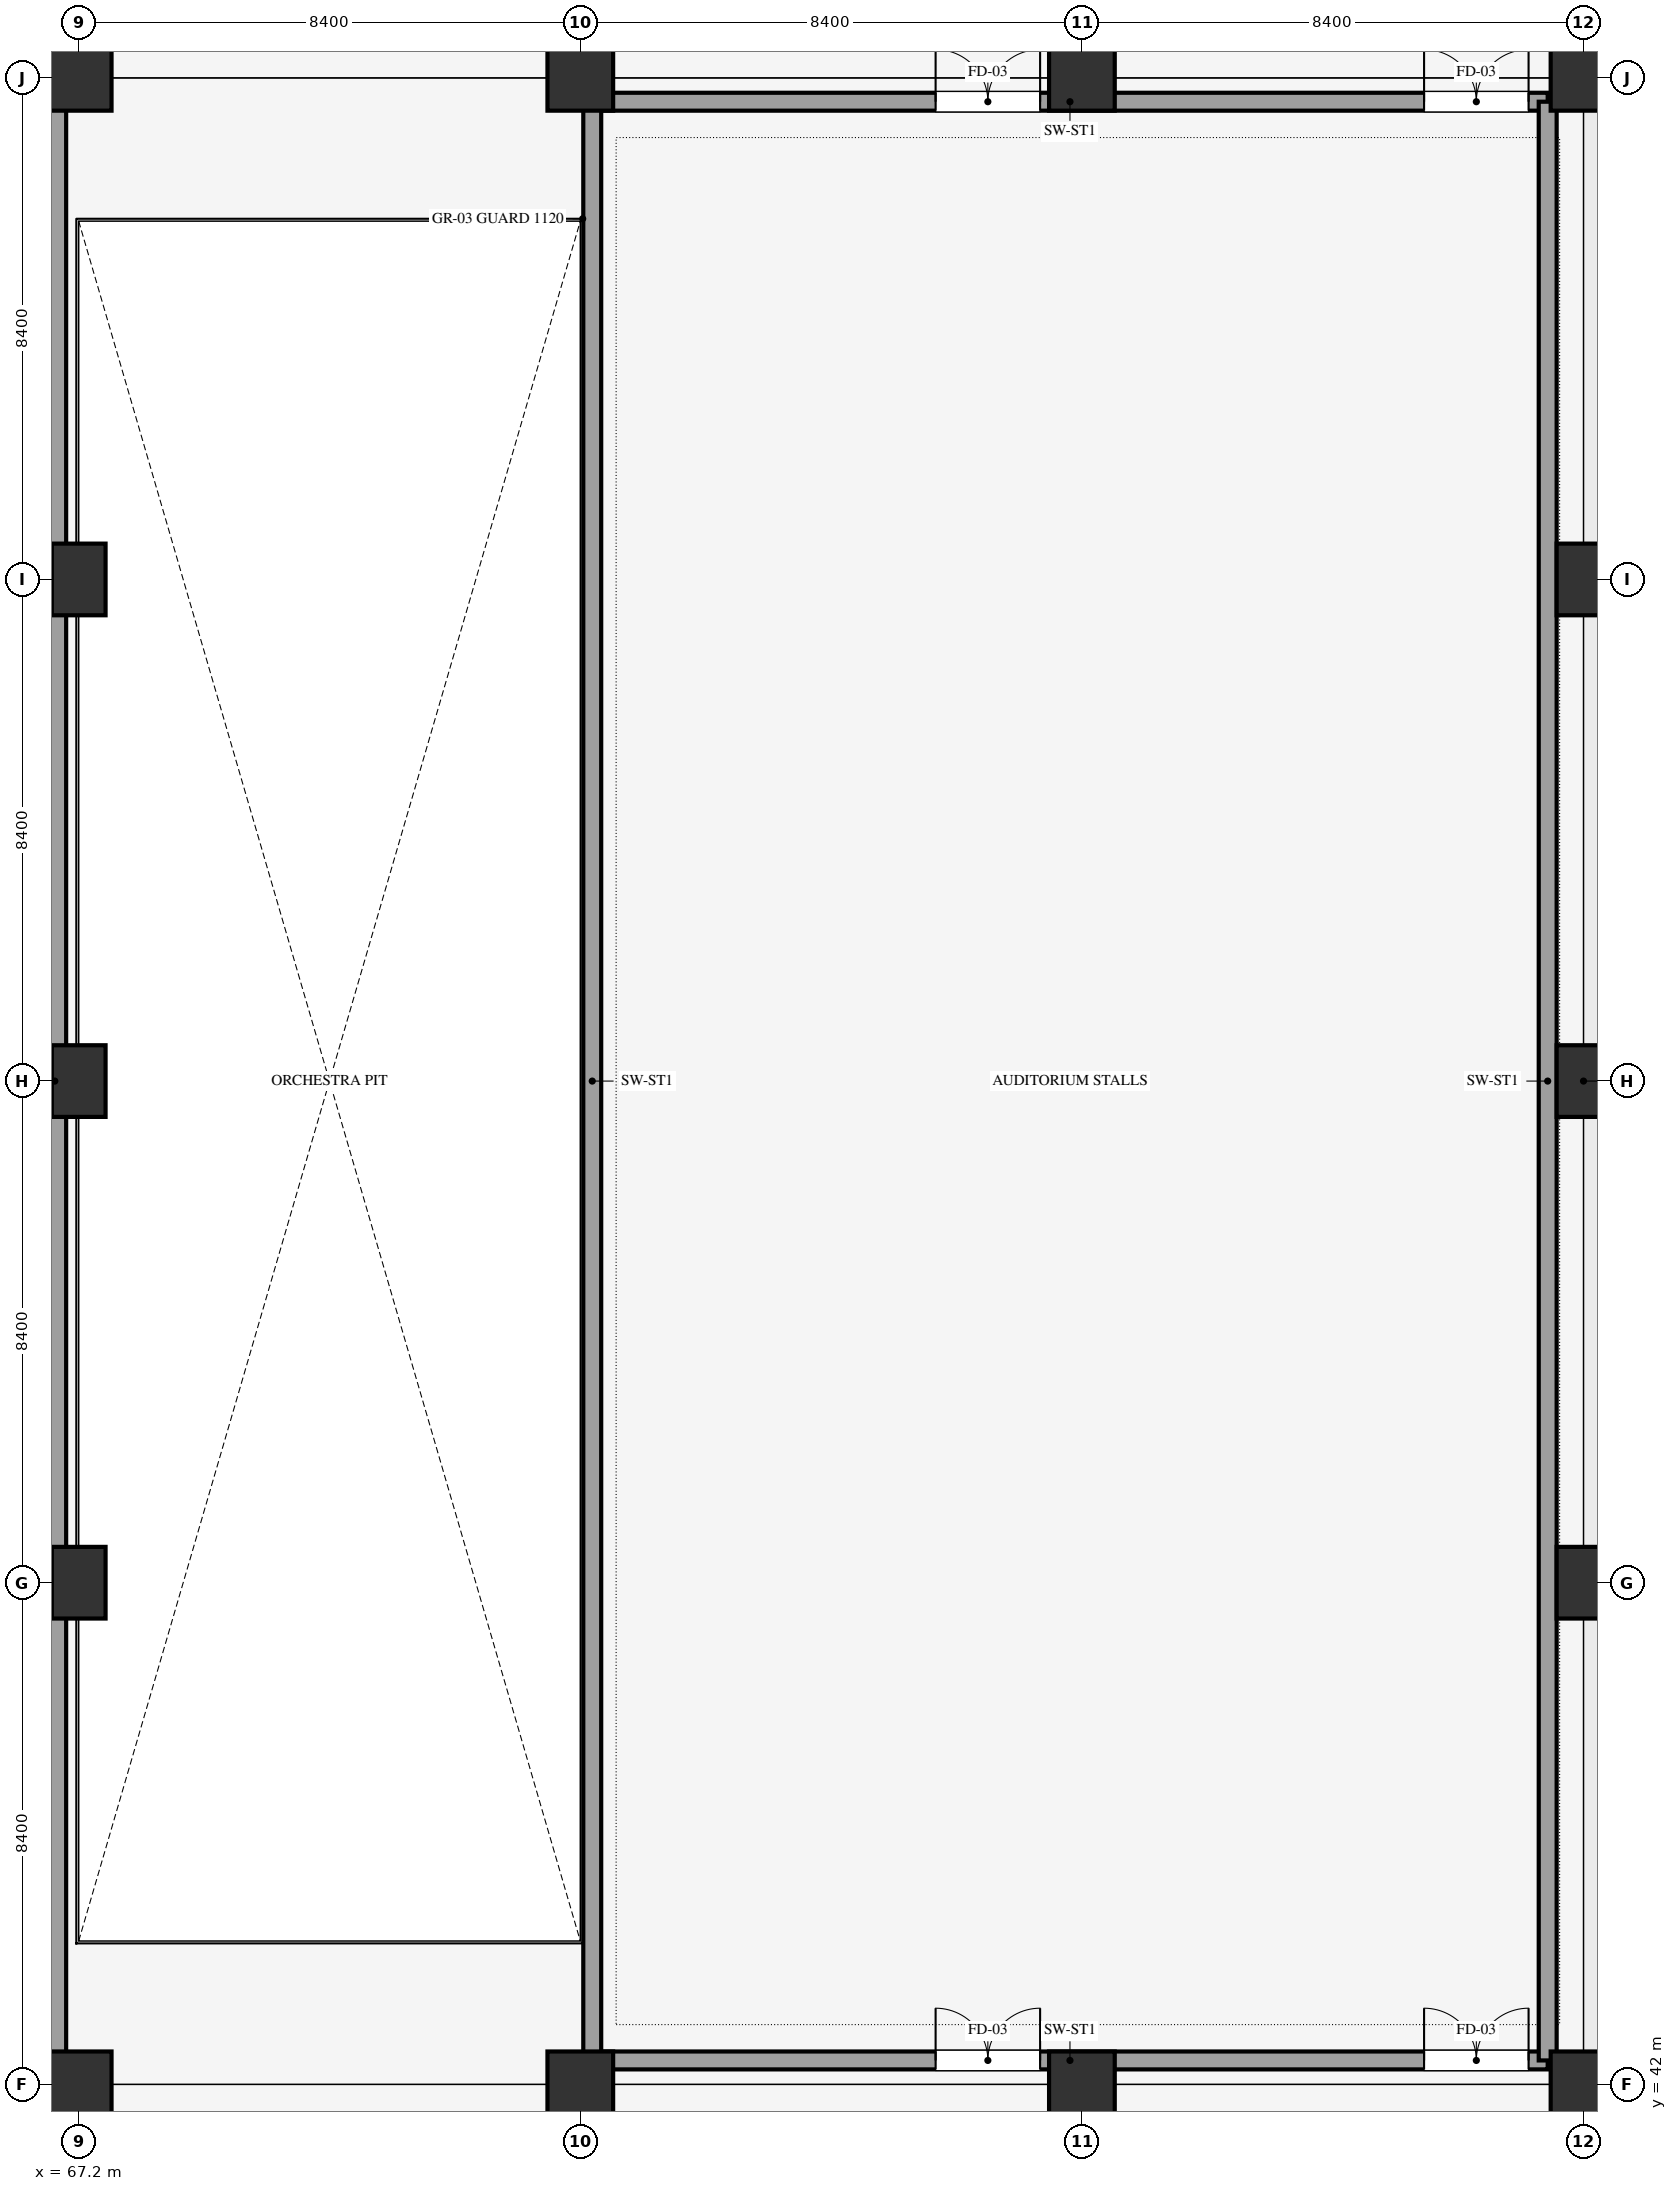
"""IFC4 building model, lengths in metres.
Left out: names, types, materials, properties, quantities, classifications, styles, units other than length and angle.
Written with IfcOpenShell. Run it as: python <this file> out.ifc"""

import sys

from ifc_helpers import new_model, si_unit, direction, frame, frame_2d, origin, origin_2d, place, context, subcontext, project, spatial, rectangle, extrude, element, fill, save


model = new_model("IFC4")
c1 = context("Model", 3, precision=1e-05, world=origin(), true_north=direction((0.0, 1.0)))
c2 = subcontext(c1, "Body", "Model", "MODEL_VIEW")
j1 = project(units=[si_unit("LENGTHUNIT", "METRE"), si_unit("PLANEANGLEUNIT", "RADIAN")], contexts=[c1])
p1 = place(None, origin())
s1 = spatial("IfcSite", under=j1, at=p1, CompositionType="ELEMENT")
p2 = place(p1, origin())
s2 = spatial("IfcBuilding", under=s1, at=p2, CompositionType="ELEMENT")
p3 = place(p2, origin())
s3 = spatial("IfcBuildingStorey", under=s2, at=p3, CompositionType="ELEMENT", Elevation=0.0)
p4 = place(p3, frame((67.2, 42.0, 0.0), z_axis=(0.0, 0.0, 1.0), x_axis=(1.0, 0.0, 0.0)))
e1 = element("IfcColumn", 1, at=p4, inside=s3, PredefinedType="COLUMN", context=c2, shape_type="SweptSolid", body=[
    extrude(rectangle(XDim=1.1, YDim=1.1, at=origin_2d()), origin(), (0.0, 0.0, 1.0), 5.4),
])
for number, where, z_axis, x_axis in (
    (2, (67.2, 50.4, 0.0), (0.0, 0.0, 1.0), (1.0, 0.0, 0.0)),
    (3, (67.2, 58.8, 0.0), (0.0, 0.0, 1.0), (1.0, 0.0, 0.0)),
    (4, (67.2, 67.2, 0.0), (0.0, 0.0, 1.0), (1.0, 0.0, 0.0)),
):
    element("IfcColumn", number, at=place(p3, frame(where, z_axis=z_axis, x_axis=x_axis)), inside=s3, PredefinedType="COLUMN", context=c2, shape_type="SweptSolid", body=[
        extrude(rectangle(XDim=0.9, YDim=1.2, at=origin_2d()), origin(), (0.0, 0.0, 1.0), 5.4),
    ])
for number, where, z_axis, x_axis in (
    (5, (67.2, 75.6, 0.0), (0.0, 0.0, 1.0), (1.0, 0.0, 0.0)),
    (6, (75.6, 42.0, 0.0), (0.0, 0.0, 1.0), (1.0, 0.0, 0.0)),
    (7, (75.6, 75.6, 0.0), (0.0, 0.0, 1.0), (1.0, 0.0, 0.0)),
    (8, (84.0, 42.0, 0.0), (0.0, 0.0, 1.0), (1.0, 0.0, 0.0)),
    (9, (84.0, 75.6, 0.0), (0.0, 0.0, 1.0), (1.0, 0.0, 0.0)),
    (10, (92.4, 42.0, 0.0), (0.0, 0.0, 1.0), (1.0, 0.0, 0.0)),
):
    element("IfcColumn", number, at=place(p3, frame(where, z_axis=z_axis, x_axis=x_axis)), inside=s3, PredefinedType="COLUMN", context=c2, shape_type="SweptSolid", body=[
        extrude(rectangle(XDim=1.1, YDim=1.1, at=origin_2d()), origin(), (0.0, 0.0, 1.0), 5.4),
    ])
for number, where, z_axis, x_axis in (
    (11, (92.4, 50.4, 0.0), (0.0, 0.0, 1.0), (1.0, 0.0, 0.0)),
    (12, (92.4, 58.8, 0.0), (0.0, 0.0, 1.0), (1.0, 0.0, 0.0)),
    (13, (92.4, 67.2, 0.0), (0.0, 0.0, 1.0), (1.0, 0.0, 0.0)),
):
    element("IfcColumn", number, at=place(p3, frame(where, z_axis=z_axis, x_axis=x_axis)), inside=s3, PredefinedType="COLUMN", context=c2, shape_type="SweptSolid", body=[
        extrude(rectangle(XDim=0.9, YDim=1.2, at=origin_2d()), origin(), (0.0, 0.0, 1.0), 5.4),
    ])
p5 = place(p3, frame((92.4, 75.6, 0.0), z_axis=(0.0, 0.0, 1.0), x_axis=(1.0, 0.0, 0.0)))
e14 = element("IfcColumn", 14, at=p5, inside=s3, PredefinedType="COLUMN", context=c2, shape_type="SweptSolid", body=[
    extrude(rectangle(XDim=1.1, YDim=1.1, at=origin_2d()), origin(), (0.0, 0.0, 1.0), 5.4),
])
p6 = place(p3, frame((42.4, 42.4, 0.0), z_axis=(0.0, 0.0, 1.0), x_axis=(1.0, 0.0, 0.0)))
e15 = element("IfcWall", 15, at=p6, inside=s3, PredefinedType="SHEAR", context=c2, shape_type="SweptSolid", body=[
    extrude(rectangle(XDim=24.4, YDim=0.38, at=frame_2d((12.2, 0.0))), origin(), (0.0, 0.0, 1.0), 4.55),
])
p7 = place(p6, frame((4.0, 0.0, 0.0)))
e16 = element("IfcOpeningElement", 16, at=p7, cuts=e15, PredefinedType="OPENING", context=c2, shape_type="SweptSolid", body=[
    extrude(rectangle(XDim=1.95, YDim=2.3, at=frame_2d((0.975, 1.15))), frame((0.0, 0.2, 0.0), z_axis=(0.0, -1.0, 0.0), x_axis=(1.0, 0.0, 0.0)), (0.0, 0.0, 1.0), 0.4),
])
p8 = place(p3, frame((42.4, 75.2, 0.0), z_axis=(0.0, 0.0, 1.0), x_axis=(1.0, 0.0, 0.0)))
e17 = element("IfcWall", 17, at=p8, inside=s3, PredefinedType="SHEAR", context=c2, shape_type="SweptSolid", body=[
    extrude(rectangle(XDim=24.4, YDim=0.38, at=frame_2d((12.2, 0.0))), origin(), (0.0, 0.0, 1.0), 4.55),
])
p9 = place(p8, frame((4.0, 0.0, 0.0)))
e18 = element("IfcOpeningElement", 18, at=p9, cuts=e17, PredefinedType="OPENING", context=c2, shape_type="SweptSolid", body=[
    extrude(rectangle(XDim=1.95, YDim=2.3, at=frame_2d((0.975, 1.15))), frame((0.0, 0.2, 0.0), z_axis=(0.0, -1.0, 0.0), x_axis=(1.0, 0.0, 0.0)), (0.0, 0.0, 1.0), 0.4),
])
p10 = place(p3, frame((66.8, 42.4, 0.0), z_axis=(0.0, 0.0, 1.0), x_axis=(0.0, 1.0, 0.0)))
e19 = element("IfcWall", 19, at=p10, inside=s3, PredefinedType="SHEAR", context=c2, shape_type="SweptSolid", body=[
    extrude(rectangle(XDim=32.8, YDim=0.38, at=frame_2d((16.4, 0.0))), origin(), (0.0, 0.0, 1.0), 4.55),
])
p11 = place(p3, frame((66.8, 17.4, 0.0), z_axis=(0.0, 0.0, 1.0), x_axis=(0.0, 1.0, 0.0)))
e20 = element("IfcWall", 20, at=p11, inside=s3, PredefinedType="SHEAR", context=c2, shape_type="SweptSolid", body=[
    extrude(rectangle(XDim=24.92, YDim=0.3, at=frame_2d((12.46, 0.0))), origin(), (0.0, 0.0, 1.0), 4.55),
])
p12 = place(p3, frame((66.8, 75.4, 0.0), z_axis=(0.0, 0.0, 1.0), x_axis=(0.0, 1.0, 0.0)))
e21 = element("IfcWall", 21, at=p12, inside=s3, PredefinedType="SHEAR", context=c2, shape_type="SweptSolid", body=[
    extrude(rectangle(XDim=24.8, YDim=0.3, at=frame_2d((12.4, 0.0))), origin(), (0.0, 0.0, 1.0), 4.55),
])
p13 = place(p3, frame((75.8, 42.4, 0.0), z_axis=(0.0, 0.0, 1.0), x_axis=(1.0, 0.0, 0.0)))
e22 = element("IfcWall", 22, at=p13, inside=s3, PredefinedType="SHEAR", context=c2, shape_type="SweptSolid", body=[
    extrude(rectangle(XDim=16.0, YDim=0.3, at=frame_2d((8.0, 0.0))), origin(), (0.0, 0.0, 1.0), 4.55),
])
p14 = place(p13, frame((5.75, 0.0, 0.0)))
e23 = element("IfcOpeningElement", 23, at=p14, cuts=e22, PredefinedType="OPENING", context=c2, shape_type="SweptSolid", body=[
    extrude(rectangle(XDim=1.75, YDim=2.2, at=frame_2d((0.875, 1.1))), frame((0.0, 0.16, 0.0), z_axis=(0.0, -1.0, 0.0), x_axis=(1.0, 0.0, 0.0)), (0.0, 0.0, 1.0), 0.32),
])
p15 = place(p13, frame((13.93, 0.0, 0.0)))
e24 = element("IfcOpeningElement", 24, at=p15, cuts=e22, PredefinedType="OPENING", context=c2, shape_type="SweptSolid", body=[
    extrude(rectangle(XDim=1.75, YDim=2.2, at=frame_2d((0.875, 1.1))), frame((0.0, 0.16, 0.0), z_axis=(0.0, -1.0, 0.0), x_axis=(1.0, 0.0, 0.0)), (0.0, 0.0, 1.0), 0.32),
])
p16 = place(p3, frame((75.8, 75.2, 0.0), z_axis=(0.0, 0.0, 1.0), x_axis=(1.0, 0.0, 0.0)))
e25 = element("IfcWall", 25, at=p16, inside=s3, PredefinedType="SHEAR", context=c2, shape_type="SweptSolid", body=[
    extrude(rectangle(XDim=16.0, YDim=0.3, at=frame_2d((8.0, 0.0))), origin(), (0.0, 0.0, 1.0), 4.55),
])
p17 = place(p16, frame((5.75, 0.0, 0.0)))
e26 = element("IfcOpeningElement", 26, at=p17, cuts=e25, PredefinedType="OPENING", context=c2, shape_type="SweptSolid", body=[
    extrude(rectangle(XDim=1.75, YDim=2.2, at=frame_2d((0.875, 1.1))), frame((0.0, 0.16, 0.0), z_axis=(0.0, -1.0, 0.0), x_axis=(1.0, 0.0, 0.0)), (0.0, 0.0, 1.0), 0.32),
])
p18 = place(p16, frame((13.93, 0.0, 0.0)))
e27 = element("IfcOpeningElement", 27, at=p18, cuts=e25, PredefinedType="OPENING", context=c2, shape_type="SweptSolid", body=[
    extrude(rectangle(XDim=1.75, YDim=2.2, at=frame_2d((0.875, 1.1))), frame((0.0, 0.16, 0.0), z_axis=(0.0, -1.0, 0.0), x_axis=(1.0, 0.0, 0.0)), (0.0, 0.0, 1.0), 0.32),
])
for number, where, z_axis, x_axis in (
    (28, (75.8, 42.4, 0.0), (0.0, 0.0, 1.0), (0.0, 1.0, 0.0)),
    (29, (91.8, 42.4, 0.0), (0.0, 0.0, 1.0), (0.0, 1.0, 0.0)),
):
    element("IfcWall", number, at=place(p3, frame(where, z_axis=z_axis, x_axis=x_axis)), inside=s3, PredefinedType="SHEAR", context=c2, shape_type="SweptSolid", body=[
        extrude(rectangle(XDim=32.8, YDim=0.3, at=frame_2d((16.4, 0.0))), origin(), (0.0, 0.0, 1.0), 4.55),
    ])
p19 = place(p3, frame((92.6, 41.6, 0.0), z_axis=(0.0, 0.0, 1.0), x_axis=(1.0, 0.0, 0.0)))
e30 = element("IfcWall", 30, at=p19, inside=s3, PredefinedType="PARTITIONING", context=c2, shape_type="SweptSolid", body=[
    extrude(rectangle(XDim=6.8, YDim=0.18, at=frame_2d((3.4, 0.0))), origin(), (0.0, 0.0, 1.0), 4.44),
])
p20 = place(p19, frame((2.4, 0.0, 0.0)))
e31 = element("IfcOpeningElement", 31, at=p20, cuts=e30, PredefinedType="OPENING", context=c2, shape_type="SweptSolid", body=[
    extrude(rectangle(XDim=1.75, YDim=2.2, at=frame_2d((0.875, 1.1))), frame((0.0, 0.1, 0.0), z_axis=(0.0, -1.0, 0.0), x_axis=(1.0, 0.0, 0.0)), (0.0, 0.0, 1.0), 0.2),
])
p21 = place(p3, frame((92.6, 34.2, 0.0), z_axis=(0.0, 0.0, 1.0), x_axis=(0.0, 1.0, 0.0)))
e32 = element("IfcWall", 32, at=p21, inside=s3, PredefinedType="PARTITIONING", context=c2, shape_type="SweptSolid", body=[
    extrude(rectangle(XDim=7.4, YDim=0.18, at=frame_2d((3.7, 0.0))), origin(), (0.0, 0.0, 1.0), 4.44),
])
p22 = place(p3, frame((92.6, 76.0, 0.0), z_axis=(0.0, 0.0, 1.0), x_axis=(1.0, 0.0, 0.0)))
e33 = element("IfcWall", 33, at=p22, inside=s3, PredefinedType="PARTITIONING", context=c2, shape_type="SweptSolid", body=[
    extrude(rectangle(XDim=6.8, YDim=0.12, at=frame_2d((3.4, 0.0))), origin(), (0.0, 0.0, 1.0), 4.44),
])
p23 = place(p22, frame((2.4, 0.0, 0.0)))
e34 = element("IfcOpeningElement", 34, at=p23, cuts=e33, PredefinedType="OPENING", context=c2, shape_type="SweptSolid", body=[
    extrude(rectangle(XDim=1.75, YDim=2.2, at=frame_2d((0.875, 1.1))), frame((0.0, 0.07, 0.0), z_axis=(0.0, -1.0, 0.0), x_axis=(1.0, 0.0, 0.0)), (0.0, 0.0, 1.0), 0.14),
])
p24 = place(p3, frame((92.6, 76.0, 0.0), z_axis=(0.0, 0.0, 1.0), x_axis=(0.0, 1.0, 0.0)))
e35 = element("IfcWall", 35, at=p24, inside=s3, PredefinedType="PARTITIONING", context=c2, shape_type="SweptSolid", body=[
    extrude(rectangle(XDim=7.4, YDim=0.12, at=frame_2d((3.7, 0.0))), origin(), (0.0, 0.0, 1.0), 4.44),
])
p25 = place(p14, origin())
e36 = element("IfcDoor", 36, at=p25, inside=s3, OperationType="DOUBLE_DOOR_SINGLE_SWING", PredefinedType="DOOR", context=c2, shape_type="SweptSolid", body=[
    extrude(rectangle(XDim=1.75, YDim=2.2, at=frame_2d((0.875, 1.1))), frame((0.0, 0.025, 0.0), z_axis=(0.0, -1.0, 0.0), x_axis=(1.0, 0.0, 0.0)), (0.0, 0.0, 1.0), 0.05),
])
fill(e23, e36)
p26 = place(p15, origin())
e37 = element("IfcDoor", 37, at=p26, inside=s3, OperationType="DOUBLE_DOOR_SINGLE_SWING", PredefinedType="DOOR", context=c2, shape_type="SweptSolid", body=[
    extrude(rectangle(XDim=1.75, YDim=2.2, at=frame_2d((0.875, 1.1))), frame((0.0, 0.025, 0.0), z_axis=(0.0, -1.0, 0.0), x_axis=(1.0, 0.0, 0.0)), (0.0, 0.0, 1.0), 0.05),
])
fill(e24, e37)
p27 = place(p17, origin())
e38 = element("IfcDoor", 38, at=p27, inside=s3, OperationType="DOUBLE_DOOR_SINGLE_SWING", PredefinedType="DOOR", context=c2, shape_type="SweptSolid", body=[
    extrude(rectangle(XDim=1.75, YDim=2.2, at=frame_2d((0.875, 1.1))), frame((0.0, 0.025, 0.0), z_axis=(0.0, -1.0, 0.0), x_axis=(1.0, 0.0, 0.0)), (0.0, 0.0, 1.0), 0.05),
])
fill(e26, e38)
p28 = place(p18, origin())
e39 = element("IfcDoor", 39, at=p28, inside=s3, OperationType="DOUBLE_DOOR_SINGLE_SWING", PredefinedType="DOOR", context=c2, shape_type="SweptSolid", body=[
    extrude(rectangle(XDim=1.75, YDim=2.2, at=frame_2d((0.875, 1.1))), frame((0.0, 0.025, 0.0), z_axis=(0.0, -1.0, 0.0), x_axis=(1.0, 0.0, 0.0)), (0.0, 0.0, 1.0), 0.05),
])
fill(e27, e39)
save(model, sys.argv[1])
